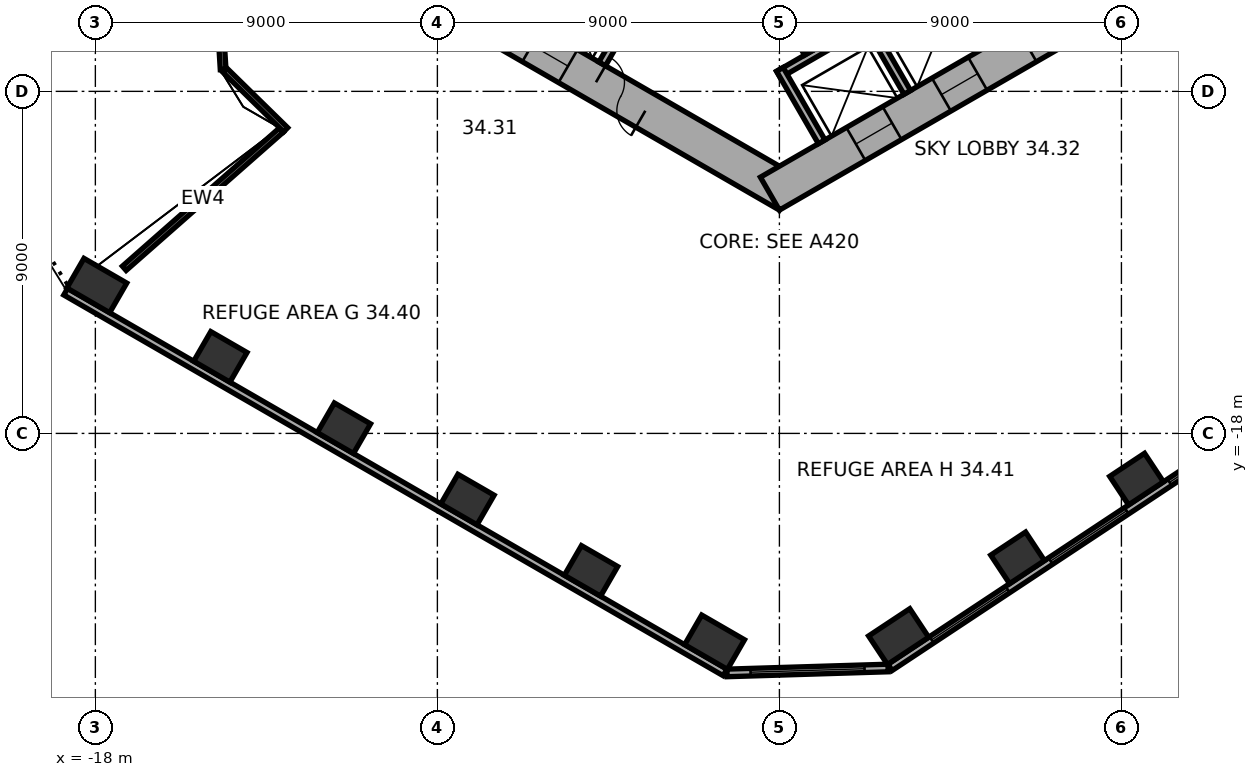
"""IFC4 building model, lengths in metres.
Left out: names, types, materials, properties, quantities, classifications, styles, units other than length and angle.
Written with IfcOpenShell. Run it as: python <this file> out.ifc"""

import sys

from ifc_helpers import new_model, si_unit, direction, frame, frame_2d, origin, origin_2d, place, context, subcontext, project, spatial, rectangle, extrude, element, fill, save


model = new_model("IFC4")
c1 = context("Model", 3, precision=1e-05, world=origin(), true_north=direction((0.0, 1.0)))
c2 = subcontext(c1, "Body", "Model", "MODEL_VIEW")
j1 = project(units=[si_unit("LENGTHUNIT", "METRE"), si_unit("PLANEANGLEUNIT", "RADIAN")], contexts=[c1])
p1 = place(None, origin())
s1 = spatial("IfcSite", under=j1, at=p1, CompositionType="ELEMENT")
p2 = place(p1, origin())
s2 = spatial("IfcBuilding", under=s1, at=p2, CompositionType="ELEMENT")
p3 = place(p2, frame((0.0, 0.0, 139.2)))
s3 = spatial("IfcBuildingStorey", under=s2, at=p3, CompositionType="ELEMENT", Elevation=139.2)
p4 = place(p3, frame((-17.962, -14.109, 0.0), z_axis=(0.0, 0.0, 1.0), x_axis=(0.866025403784, -0.5, 0.0)))
e1 = element("IfcColumn", 1, at=p4, inside=s3, PredefinedType="COLUMN", context=c2, shape_type="SweptSolid", body=[
    extrude(rectangle(XDim=1.3, YDim=0.9, at=origin_2d()), origin(), (0.0, 0.0, 1.0), 7.4),
])
for number, where, z_axis, x_axis in (
    (2, (-14.711, -15.986, 0.0), (0.0, 0.0, 1.0), (0.866, -0.5, 0.0)),
    (3, (-11.46, -17.863, 0.0), (0.0, 0.0, 1.0), (0.866, -0.5, 0.0)),
    (4, (-8.208, -19.74, 0.0), (0.0, 0.0, 1.0), (0.866, -0.5, 0.0)),
    (5, (-4.958, -21.617, 0.0), (0.0, 0.0, 1.0), (0.866, -0.5, 0.0)),
):
    element("IfcColumn", number, at=place(p3, frame(where, z_axis=z_axis, x_axis=x_axis)), inside=s3, PredefinedType="COLUMN", context=c2, shape_type="SweptSolid", body=[
        extrude(rectangle(XDim=1.1, YDim=0.9, at=origin_2d()), origin(), (0.0, 0.0, 1.0), 7.4),
    ])
for number, where, z_axis, x_axis in (
    (6, (-1.706, -23.494, 0.0), (0.0, 0.0, 1.0), (0.866, -0.5, 0.0)),
    (7, (3.137, -23.346, 0.0), (0.0, 0.0, 1.0), (0.834, 0.552, 0.0)),
):
    element("IfcColumn", number, at=place(p3, frame(where, z_axis=z_axis, x_axis=x_axis)), inside=s3, PredefinedType="COLUMN", context=c2, shape_type="SweptSolid", body=[
        extrude(rectangle(XDim=1.3, YDim=0.9, at=origin_2d()), origin(), (0.0, 0.0, 1.0), 7.4),
    ])
for number, where, z_axis, x_axis in (
    (8, (6.268, -21.274, 0.0), (0.0, 0.0, 1.0), (0.834, 0.552, 0.0)),
    (9, (9.398, -19.202, 0.0), (0.0, 0.0, 1.0), (0.834, 0.552, 0.0)),
):
    element("IfcColumn", number, at=place(p3, frame(where, z_axis=z_axis, x_axis=x_axis)), inside=s3, PredefinedType="COLUMN", context=c2, shape_type="SweptSolid", body=[
        extrude(rectangle(XDim=1.1, YDim=0.9, at=origin_2d()), origin(), (0.0, 0.0, 1.0), 7.4),
    ])
p5 = place(p3, frame((-10.25, -5.629, 0.0), z_axis=(0.0, 0.0, 1.0), x_axis=(0.866022616891, -0.50000482701, 0.0)))
e10 = element("IfcWall", 10, at=p5, inside=s3, PredefinedType="SHEAR", context=c2, shape_type="SweptSolid", body=[
    extrude(rectangle(XDim=12.125, YDim=1.0, at=frame_2d((6.062, 0.0))), origin(), (0.0, 0.0, 1.0), 7.4),
])
p6 = place(p5, frame((6.262, 0.0, 0.0)))
e11 = element("IfcOpeningElement", 11, at=p6, cuts=e10, PredefinedType="OPENING", context=c2, shape_type="SweptSolid", body=[
    extrude(rectangle(XDim=1.5, YDim=2.1, at=frame_2d((0.75, 1.05))), frame((0.0, 0.51, 0.0), z_axis=(0.0, -1.0, 0.0), x_axis=(1.0, 0.0, 0.0)), (0.0, 0.0, 1.0), 1.02),
])
p7 = place(p5, frame((1.712, 0.0, 0.0)))
e12 = element("IfcOpeningElement", 12, at=p7, cuts=e10, PredefinedType="OPENING", context=c2, shape_type="SweptSolid", body=[
    extrude(rectangle(XDim=1.1, YDim=2.1, at=frame_2d((0.55, 1.05))), frame((0.0, 0.51, 0.0), z_axis=(0.0, -1.0, 0.0), x_axis=(1.0, 0.0, 0.0)), (0.0, 0.0, 1.0), 1.02),
])
p8 = place(p5, frame((4.312, 0.0, 0.0)))
e13 = element("IfcOpeningElement", 13, at=p8, cuts=e10, PredefinedType="OPENING", context=c2, shape_type="SweptSolid", body=[
    extrude(rectangle(XDim=1.1, YDim=2.1, at=frame_2d((0.55, 1.05))), frame((0.0, 0.51, 0.0), z_axis=(0.0, -1.0, 0.0), x_axis=(1.0, 0.0, 0.0)), (0.0, 0.0, 1.0), 1.02),
])
p9 = place(p3, frame((-0.25, -11.691, 0.0), z_axis=(0.0, 0.0, 1.0), x_axis=(0.866022616891, 0.50000482701, 0.0)))
e14 = element("IfcWall", 14, at=p9, inside=s3, PredefinedType="SHEAR", context=c2, shape_type="SweptSolid", body=[
    extrude(rectangle(XDim=12.125, YDim=1.0, at=frame_2d((6.062, 0.0))), origin(), (0.0, 0.0, 1.0), 7.4),
])
p10 = place(p9, frame((2.612, 0.0, 0.0)))
e15 = element("IfcOpeningElement", 15, at=p10, cuts=e14, PredefinedType="OPENING", context=c2, shape_type="SweptSolid", body=[
    extrude(rectangle(XDim=1.1, YDim=2.1, at=frame_2d((0.55, 1.05))), frame((0.0, 0.51, 0.0), z_axis=(0.0, -1.0, 0.0), x_axis=(1.0, 0.0, 0.0)), (0.0, 0.0, 1.0), 1.02),
])
p11 = place(p9, frame((5.212, 0.0, 0.0)))
e16 = element("IfcOpeningElement", 16, at=p11, cuts=e14, PredefinedType="OPENING", context=c2, shape_type="SweptSolid", body=[
    extrude(rectangle(XDim=1.1, YDim=2.1, at=frame_2d((0.55, 1.05))), frame((0.0, 0.51, 0.0), z_axis=(0.0, -1.0, 0.0), x_axis=(1.0, 0.0, 0.0)), (0.0, 0.0, 1.0), 1.02),
])
p12 = place(p9, frame((7.812, 0.0, 0.0)))
e17 = element("IfcOpeningElement", 17, at=p12, cuts=e14, PredefinedType="OPENING", context=c2, shape_type="SweptSolid", body=[
    extrude(rectangle(XDim=1.1, YDim=2.1, at=frame_2d((0.55, 1.05))), frame((0.0, 0.51, 0.0), z_axis=(0.0, -1.0, 0.0), x_axis=(1.0, 0.0, 0.0)), (0.0, 0.0, 1.0), 1.02),
])
p13 = place(p3, frame((-18.781, -14.271, 0.0), z_axis=(0.0, 0.0, 1.0), x_axis=(0.866026084105, -0.499998821648, 0.0)))
e18 = element("IfcWall", 18, at=p13, inside=s3, PredefinedType="STANDARD", context=c2, shape_type="SweptSolid", body=[
    extrude(rectangle(XDim=20.035, YDim=0.2, at=frame_2d((10.017, 0.0))), origin(), (0.0, 0.0, 1.0), 7.4),
])
p14 = place(p3, frame((-1.378, -24.302, 0.0), z_axis=(0.0, 0.0, 1.0), x_axis=(0.999533857267, 0.030529791629, 0.0)))
e19 = element("IfcWall", 19, at=p14, inside=s3, PredefinedType="STANDARD", context=c2, shape_type="SweptSolid", body=[
    extrude(rectangle(XDim=4.238, YDim=0.2, at=frame_2d((2.119, 0.0))), origin(), (0.0, 0.0, 1.0), 7.4),
])
p15 = place(p14, frame((0.619, 0.0, 0.8)))
e20 = element("IfcOpeningElement", 20, at=p15, cuts=e19, PredefinedType="OPENING", context=c2, shape_type="SweptSolid", body=[
    extrude(rectangle(XDim=3.0, YDim=4.2, at=frame_2d((1.5, 2.1))), frame((0.0, 0.11, 0.0), z_axis=(0.0, -1.0, 0.0), x_axis=(1.0, 0.0, 0.0)), (0.0, 0.0, 1.0), 0.22),
])
p16 = place(p3, frame((2.911, -24.156, 0.0), z_axis=(0.0, 0.0, 1.0), x_axis=(0.833882163564, 0.551942512668, 0.0)))
e21 = element("IfcWall", 21, at=p16, inside=s3, PredefinedType="STANDARD", context=c2, shape_type="SweptSolid", body=[
    extrude(rectangle(XDim=20.044, YDim=0.2, at=frame_2d((10.022, 0.0))), origin(), (0.0, 0.0, 1.0), 7.4),
])
p17 = place(p16, frame((1.313, 0.0, 0.8)))
e22 = element("IfcOpeningElement", 22, at=p17, cuts=e21, PredefinedType="OPENING", context=c2, shape_type="SweptSolid", body=[
    extrude(rectangle(XDim=2.4, YDim=4.2, at=frame_2d((1.2, 2.1))), frame((0.0, 0.11, 0.0), z_axis=(0.0, -1.0, 0.0), x_axis=(1.0, 0.0, 0.0)), (0.0, 0.0, 1.0), 0.22),
])
p18 = place(p16, frame((5.067, 0.0, 0.8)))
e23 = element("IfcOpeningElement", 23, at=p18, cuts=e21, PredefinedType="OPENING", context=c2, shape_type="SweptSolid", body=[
    extrude(rectangle(XDim=2.4, YDim=4.2, at=frame_2d((1.2, 2.1))), frame((0.0, 0.11, 0.0), z_axis=(0.0, -1.0, 0.0), x_axis=(1.0, 0.0, 0.0)), (0.0, 0.0, 1.0), 0.22),
])
p19 = place(p16, frame((8.821, 0.0, 0.8)))
e24 = element("IfcOpeningElement", 24, at=p19, cuts=e21, PredefinedType="OPENING", context=c2, shape_type="SweptSolid", body=[
    extrude(rectangle(XDim=2.4, YDim=4.2, at=frame_2d((1.2, 2.1))), frame((0.0, 0.11, 0.0), z_axis=(0.0, -1.0, 0.0), x_axis=(1.0, 0.0, 0.0)), (0.0, 0.0, 1.0), 0.22),
])
p20 = place(p16, frame((12.575, 0.0, 0.8)))
e25 = element("IfcOpeningElement", 25, at=p20, cuts=e21, PredefinedType="OPENING", context=c2, shape_type="SweptSolid", body=[
    extrude(rectangle(XDim=2.4, YDim=4.2, at=frame_2d((1.2, 2.1))), frame((0.0, 0.11, 0.0), z_axis=(0.0, -1.0, 0.0), x_axis=(1.0, 0.0, 0.0)), (0.0, 0.0, 1.0), 0.22),
])
p21 = place(p16, frame((16.329, 0.0, 0.8)))
e26 = element("IfcOpeningElement", 26, at=p21, cuts=e21, PredefinedType="OPENING", context=c2, shape_type="SweptSolid", body=[
    extrude(rectangle(XDim=2.4, YDim=4.2, at=frame_2d((1.2, 2.1))), frame((0.0, 0.11, 0.0), z_axis=(0.0, -1.0, 0.0), x_axis=(1.0, 0.0, 0.0)), (0.0, 0.0, 1.0), 0.22),
])
p22 = place(p3, frame((-17.239, -13.656, 0.0), z_axis=(0.0, 0.0, 1.0), x_axis=(0.750678331628, 0.660667876034, 0.0)))
e27 = element("IfcWall", 27, at=p22, inside=s3, PredefinedType="STANDARD", context=c2, shape_type="SweptSolid", body=[
    extrude(rectangle(XDim=5.506, YDim=0.15, at=frame_2d((2.753, 0.0))), origin(), (0.0, 0.0, 1.0), 2.6),
])
p23 = place(p3, frame((-12.991, -10.01, 0.0), z_axis=(0.0, 0.0, 1.0), x_axis=(-0.714492233151, 0.69964337256, 0.0)))
e28 = element("IfcWall", 28, at=p23, inside=s3, PredefinedType="STANDARD", context=c2, shape_type="SweptSolid", body=[
    extrude(rectangle(XDim=2.236, YDim=0.15, at=frame_2d((1.118, 0.0))), origin(), (0.0, 0.0, 1.0), 2.6),
])
p24 = place(p3, frame((-14.638, -8.425, 0.0), z_axis=(0.0, 0.0, 1.0), x_axis=(-0.06105243285, 0.998134560289, 0.0)))
e29 = element("IfcWall", 29, at=p24, inside=s3, PredefinedType="STANDARD", context=c2, shape_type="SweptSolid", body=[
    extrude(rectangle(XDim=16.451, YDim=0.15, at=frame_2d((8.226, 0.0))), origin(), (0.0, 0.0, 1.0), 2.6),
])
p25 = place(p24, frame((3.213, 0.0, 0.0)))
e30 = element("IfcOpeningElement", 30, at=p25, cuts=e29, PredefinedType="OPENING", context=c2, shape_type="SweptSolid", body=[
    extrude(rectangle(XDim=1.8, YDim=2.4, at=frame_2d((0.9, 1.2))), frame((0.0, 0.085, 0.0), z_axis=(0.0, -1.0, 0.0), x_axis=(1.0, 0.0, 0.0)), (0.0, 0.0, 1.0), 0.17),
])
p26 = place(p24, frame((11.438, 0.0, 0.0)))
e31 = element("IfcOpeningElement", 31, at=p26, cuts=e29, PredefinedType="OPENING", context=c2, shape_type="SweptSolid", body=[
    extrude(rectangle(XDim=1.8, YDim=2.4, at=frame_2d((0.9, 1.2))), frame((0.0, 0.085, 0.0), z_axis=(0.0, -1.0, 0.0), x_axis=(1.0, 0.0, 0.0)), (0.0, 0.0, 1.0), 0.17),
])
p27 = place(p3, frame((-3.563, -6.372, 0.0), z_axis=(0.0, 0.0, 1.0), x_axis=(-0.499994660107, -0.866028486751, 0.0)))
e32 = element("IfcWall", 32, at=p27, inside=s3, PredefinedType="PARTITIONING", context=c2, shape_type="SweptSolid", body=[
    extrude(rectangle(XDim=2.2, YDim=0.2, at=frame_2d((1.1, 0.0))), origin(), (0.0, 0.0, 1.0), 7.12),
])
p28 = place(p3, frame((-0.024, -8.559, 0.0), z_axis=(0.0, 0.0, 1.0), x_axis=(0.866026010844, 0.49999894854, 0.0)))
e33 = element("IfcWall", 33, at=p28, inside=s3, PredefinedType="PARTITIONING", context=c2, shape_type="SweptSolid", body=[
    extrude(rectangle(XDim=8.0, YDim=0.2, at=frame_2d((4.0, 0.0))), origin(), (0.0, 0.0, 1.0), 7.12),
])
for number, where, z_axis, x_axis in (
    (34, (0.013, -8.422, 0.0), (0.0, 0.0, 1.0), (0.5, -0.866, 0.0)),
    (35, (2.264, -7.122, 0.0), (0.0, 0.0, 1.0), (0.5, -0.866, 0.0)),
):
    element("IfcWall", number, at=place(p3, frame(where, z_axis=z_axis, x_axis=x_axis)), inside=s3, PredefinedType="PARTITIONING", context=c2, shape_type="SweptSolid", body=[
        extrude(rectangle(XDim=2.2, YDim=0.2, at=frame_2d((1.1, 0.0))), origin(), (0.0, 0.0, 1.0), 7.12),
    ])
p29 = place(p3, frame((-1.558, -3.902, 0.0), z_axis=(0.0, 0.0, 1.0), x_axis=(0.499977259774, -0.866038532462, 0.0)))
e36 = element("IfcWall", 36, at=p29, inside=s3, PredefinedType="SHEAR", context=c2, shape_type="SweptSolid", body=[
    extrude(rectangle(XDim=4.7, YDim=0.3, at=frame_2d((2.35, 0.0))), origin(), (0.0, 0.0, 1.0), 7.12),
])
p30 = place(p29, frame((0.8, 0.0, 0.0)))
e37 = element("IfcOpeningElement", 37, at=p30, cuts=e36, PredefinedType="OPENING", context=c2, shape_type="SweptSolid", body=[
    extrude(rectangle(XDim=1.2, YDim=2.1, at=frame_2d((0.6, 1.05))), frame((0.0, 0.16, 0.0), z_axis=(0.0, -1.0, 0.0), x_axis=(1.0, 0.0, 0.0)), (0.0, 0.0, 1.0), 0.32),
])
p31 = place(p15, origin())
e38 = element("IfcWindow", 38, at=p31, inside=s3, PartitioningType="SINGLE_PANEL", PredefinedType="WINDOW", context=c2, shape_type="SweptSolid", body=[
    extrude(rectangle(XDim=3.0, YDim=4.2, at=frame_2d((1.5, 2.1))), frame((0.0, 0.03, 0.0), z_axis=(0.0, -1.0, 0.0), x_axis=(1.0, 0.0, 0.0)), (0.0, 0.0, 1.0), 0.06),
])
fill(e20, e38)
p32 = place(p17, origin())
e39 = element("IfcWindow", 39, at=p32, inside=s3, PartitioningType="SINGLE_PANEL", PredefinedType="WINDOW", context=c2, shape_type="SweptSolid", body=[
    extrude(rectangle(XDim=2.4, YDim=4.2, at=frame_2d((1.2, 2.1))), frame((0.0, 0.03, 0.0), z_axis=(0.0, -1.0, 0.0), x_axis=(1.0, 0.0, 0.0)), (0.0, 0.0, 1.0), 0.06),
])
fill(e22, e39)
p33 = place(p18, origin())
e40 = element("IfcWindow", 40, at=p33, inside=s3, PartitioningType="SINGLE_PANEL", PredefinedType="WINDOW", context=c2, shape_type="SweptSolid", body=[
    extrude(rectangle(XDim=2.4, YDim=4.2, at=frame_2d((1.2, 2.1))), frame((0.0, 0.03, 0.0), z_axis=(0.0, -1.0, 0.0), x_axis=(1.0, 0.0, 0.0)), (0.0, 0.0, 1.0), 0.06),
])
fill(e23, e40)
p34 = place(p19, origin())
e41 = element("IfcWindow", 41, at=p34, inside=s3, PartitioningType="SINGLE_PANEL", PredefinedType="WINDOW", context=c2, shape_type="SweptSolid", body=[
    extrude(rectangle(XDim=2.4, YDim=4.2, at=frame_2d((1.2, 2.1))), frame((0.0, 0.03, 0.0), z_axis=(0.0, -1.0, 0.0), x_axis=(1.0, 0.0, 0.0)), (0.0, 0.0, 1.0), 0.06),
])
fill(e24, e41)
p35 = place(p6, origin())
e42 = element("IfcDoor", 42, at=p35, inside=s3, OperationType="DOUBLE_DOOR_SINGLE_SWING", PredefinedType="DOOR", context=c2, shape_type="SweptSolid", body=[
    extrude(rectangle(XDim=1.5, YDim=2.1, at=frame_2d((0.75, 1.05))), frame((0.0, 0.025, 0.0), z_axis=(0.0, -1.0, 0.0), x_axis=(1.0, 0.0, 0.0)), (0.0, 0.0, 1.0), 0.05),
])
fill(e11, e42)
p36 = place(p8, origin())
e43 = element("IfcDoor", 43, at=p36, inside=s3, OperationType="DOUBLE_DOOR_SLIDING", PredefinedType="DOOR", context=c2, shape_type="SweptSolid", body=[
    extrude(rectangle(XDim=1.1, YDim=2.1, at=frame_2d((0.55, 1.05))), frame((0.0, 0.025, 0.0), z_axis=(0.0, -1.0, 0.0), x_axis=(1.0, 0.0, 0.0)), (0.0, 0.0, 1.0), 0.05),
])
fill(e13, e43)
p37 = place(p10, origin())
e44 = element("IfcDoor", 44, at=p37, inside=s3, OperationType="DOUBLE_DOOR_SLIDING", PredefinedType="DOOR", context=c2, shape_type="SweptSolid", body=[
    extrude(rectangle(XDim=1.1, YDim=2.1, at=frame_2d((0.55, 1.05))), frame((0.0, 0.025, 0.0), z_axis=(0.0, -1.0, 0.0), x_axis=(1.0, 0.0, 0.0)), (0.0, 0.0, 1.0), 0.05),
])
fill(e15, e44)
p38 = place(p11, origin())
e45 = element("IfcDoor", 45, at=p38, inside=s3, OperationType="DOUBLE_DOOR_SLIDING", PredefinedType="DOOR", context=c2, shape_type="SweptSolid", body=[
    extrude(rectangle(XDim=1.1, YDim=2.1, at=frame_2d((0.55, 1.05))), frame((0.0, 0.025, 0.0), z_axis=(0.0, -1.0, 0.0), x_axis=(1.0, 0.0, 0.0)), (0.0, 0.0, 1.0), 0.05),
])
fill(e16, e45)
save(model, sys.argv[1])
